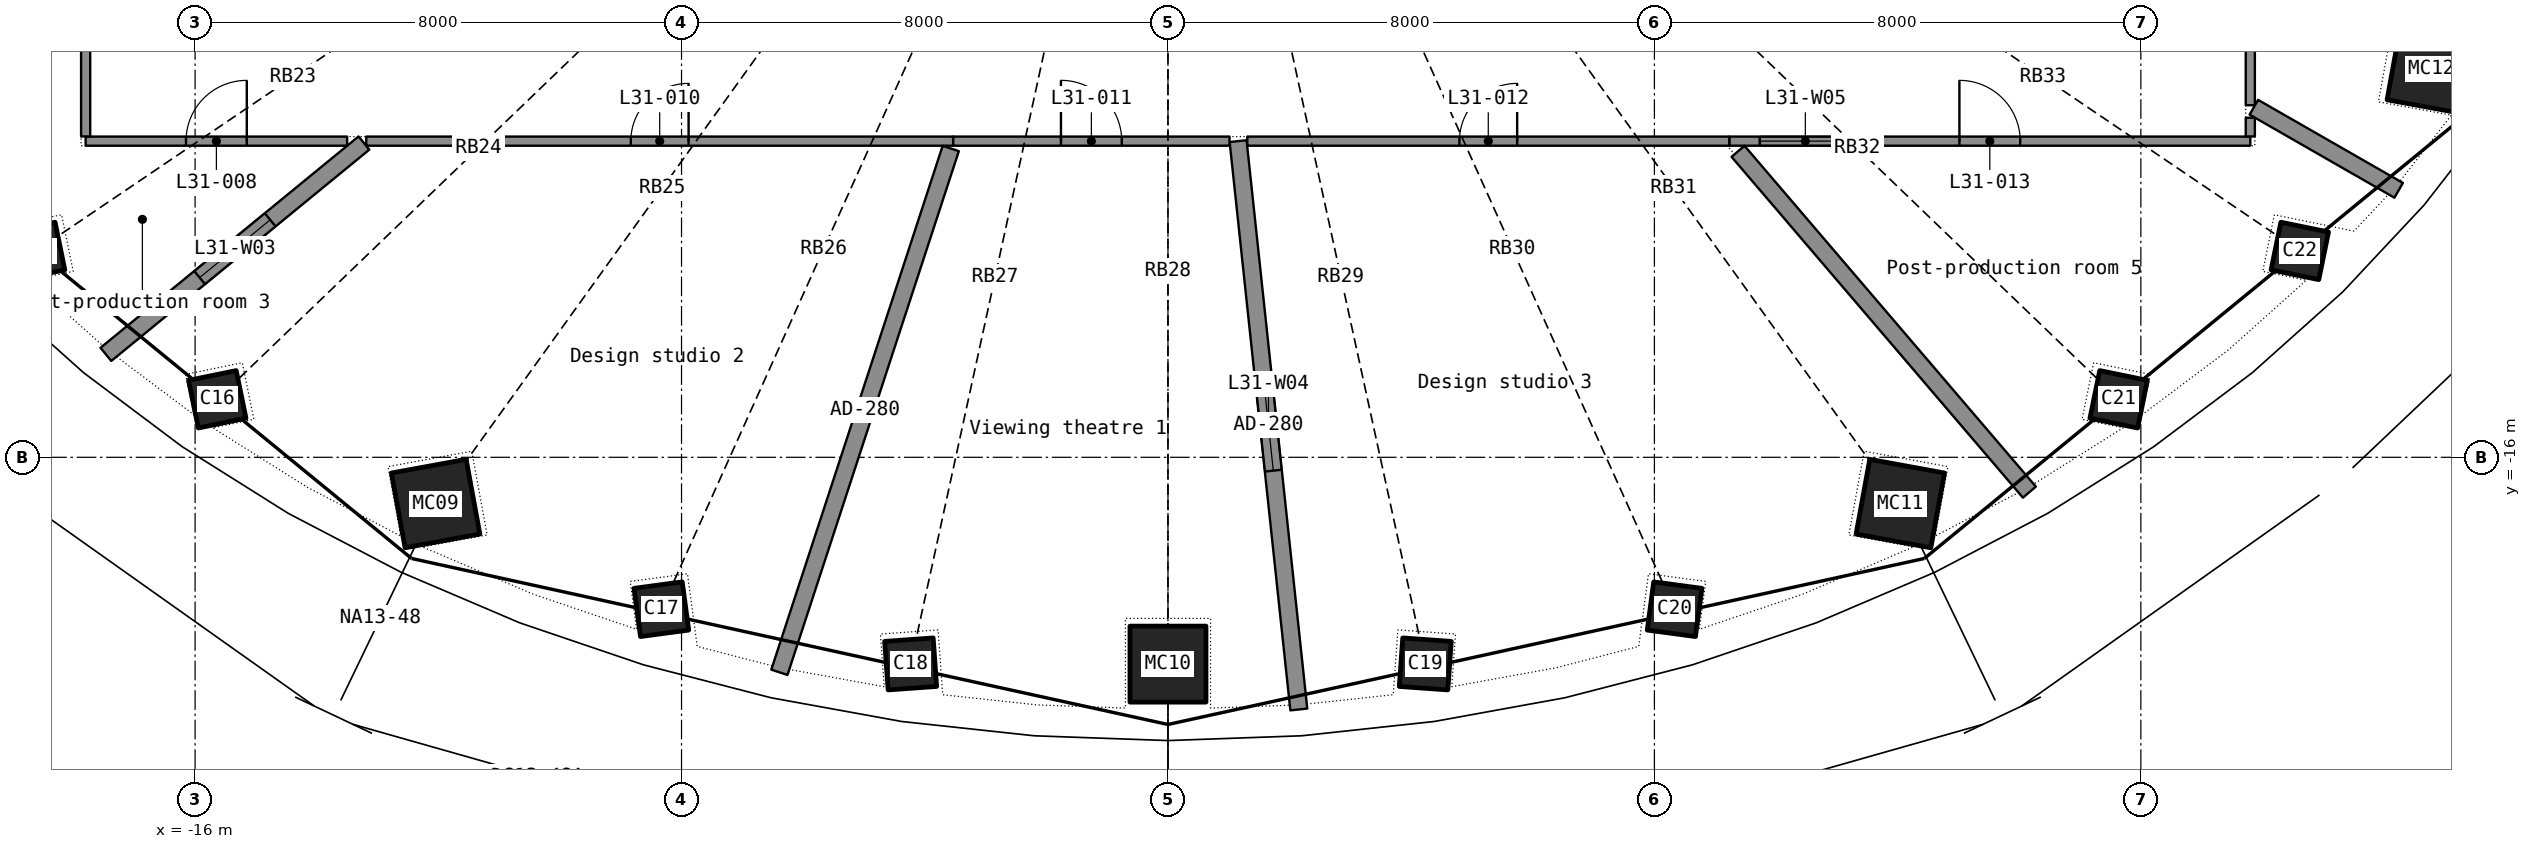
"""IFC4 building model, lengths in metres.
Left out: names, types, materials, properties, quantities, classifications, styles, units other than length and angle.
Written with IfcOpenShell. Run it as: python <this file> out.ifc"""

import sys

from ifc_helpers import new_model, si_unit, direction, frame, frame_2d, origin, origin_2d, place, context, subcontext, project, spatial, rectangle, hollow_rectangle, extrude, element, fill, save


model = new_model("IFC4")
c1 = context("Model", 3, precision=1e-05, world=origin(), true_north=direction((0.0, 1.0)))
c2 = subcontext(c1, "Body", "Model", "MODEL_VIEW")
j1 = project(units=[si_unit("LENGTHUNIT", "METRE"), si_unit("PLANEANGLEUNIT", "RADIAN")], contexts=[c1])
p1 = place(None, origin())
s1 = spatial("IfcSite", under=j1, at=p1, CompositionType="ELEMENT")
p2 = place(p1, origin())
s2 = spatial("IfcBuilding", under=s1, at=p2, CompositionType="ELEMENT")
p3 = place(p2, frame((0.0, 0.0, 130.4)))
s3 = spatial("IfcBuildingStorey", under=s2, at=p3, CompositionType="ELEMENT", Elevation=130.4)
p4 = place(p3, frame((-18.615, -12.606, 0.0), z_axis=(0.026510431, 0.018201192, 0.999482823), x_axis=(-0.719947485, 0.693998498, 0.006457858)))
e1 = element("IfcColumn", 1, at=p4, inside=s3, PredefinedType="COLUMN", context=c2, shape_type="SweptSolid", body=[
    extrude(hollow_rectangle(XDim=0.8, YDim=0.8, WallThickness=0.025, at=origin_2d()), origin(), (0.0, 0.0, 1.0), 3.702),
])
p5 = place(p3, frame((-15.635, -15.046, 0.0), z_axis=(0.02222469, 0.021697101, 0.999517533), x_axis=(-0.828096542, 0.560550728, 0.006244876)))
e2 = element("IfcColumn", 2, at=p5, inside=s3, PredefinedType="COLUMN", context=c2, shape_type="SweptSolid", body=[
    extrude(hollow_rectangle(XDim=0.8, YDim=0.8, WallThickness=0.025, at=origin_2d()), origin(), (0.0, 0.0, 1.0), 3.702),
])
p6 = place(p3, frame((-12.044, -16.76, 0.0), z_axis=(0.017279098, 0.024533681, 0.999549664), x_axis=(-0.907978887, 0.418980963, 0.005412348)))
e3 = element("IfcColumn", 3, at=p6, inside=s3, PredefinedType="COLUMN", context=c2, shape_type="SweptSolid", body=[
    extrude(hollow_rectangle(XDim=1.25, YDim=1.25, WallThickness=0.032, at=origin_2d()), origin(), (0.0, 0.0, 1.0), 3.702),
])
for number, where, z_axis, x_axis in (
    (4, (-8.332, -18.499, 0.0), (0.012, 0.027, 1.0), (-0.96, 0.28, 0.004)),
    (5, (-4.232, -19.398, 0.0), (0.006, 0.028, 1.0), (-0.99, 0.14, 0.002)),
):
    element("IfcColumn", number, at=place(p3, frame(where, z_axis=z_axis, x_axis=x_axis)), inside=s3, PredefinedType="COLUMN", context=c2, shape_type="SweptSolid", body=[
        extrude(hollow_rectangle(XDim=0.8, YDim=0.8, WallThickness=0.025, at=origin_2d()), origin(), (0.0, 0.0, 1.0), 3.702),
    ])
p7 = place(p3, frame((0.0, -19.402, 0.0), z_axis=(0.0, 0.02836019, 0.999597769), x_axis=(-1.0, 0.0, 0.0)))
e6 = element("IfcColumn", 6, at=p7, inside=s3, PredefinedType="COLUMN", context=c2, shape_type="SweptSolid", body=[
    extrude(hollow_rectangle(XDim=1.25, YDim=1.25, WallThickness=0.032, at=origin_2d()), origin(), (0.0, 0.0, 1.0), 3.702),
])
for number, where, z_axis, x_axis in (
    (7, (4.232, -19.398, 0.0), (-0.006, 0.028, 1.0), (-0.99, -0.14, -0.002)),
    (8, (8.332, -18.499, 0.0), (-0.012, 0.027, 1.0), (-0.96, -0.28, -0.004)),
):
    element("IfcColumn", number, at=place(p3, frame(where, z_axis=z_axis, x_axis=x_axis)), inside=s3, PredefinedType="COLUMN", context=c2, shape_type="SweptSolid", body=[
        extrude(hollow_rectangle(XDim=0.8, YDim=0.8, WallThickness=0.025, at=origin_2d()), origin(), (0.0, 0.0, 1.0), 3.702),
    ])
p8 = place(p3, frame((12.044, -16.76, 0.0), z_axis=(-0.017279098, 0.024533681, 0.999549664), x_axis=(-0.907978887, -0.418980963, -0.005412348)))
e9 = element("IfcColumn", 9, at=p8, inside=s3, PredefinedType="COLUMN", context=c2, shape_type="SweptSolid", body=[
    extrude(hollow_rectangle(XDim=1.25, YDim=1.25, WallThickness=0.032, at=origin_2d()), origin(), (0.0, 0.0, 1.0), 3.702),
])
p9 = place(p3, frame((15.635, -15.046, 0.0), z_axis=(-0.02222469, 0.021697101, 0.999517533), x_axis=(-0.828096542, -0.560550728, -0.006244876)))
e10 = element("IfcColumn", 10, at=p9, inside=s3, PredefinedType="COLUMN", context=c2, shape_type="SweptSolid", body=[
    extrude(hollow_rectangle(XDim=0.8, YDim=0.8, WallThickness=0.025, at=origin_2d()), origin(), (0.0, 0.0, 1.0), 3.702),
])
p10 = place(p3, frame((18.615, -12.606, 0.0), z_axis=(-0.026510431, 0.018201192, 0.999482823), x_axis=(-0.719947485, -0.693998498, -0.006457858)))
e11 = element("IfcColumn", 11, at=p10, inside=s3, PredefinedType="COLUMN", context=c2, shape_type="SweptSolid", body=[
    extrude(hollow_rectangle(XDim=0.8, YDim=0.8, WallThickness=0.025, at=origin_2d()), origin(), (0.0, 0.0, 1.0), 3.702),
])
p11 = place(p3, frame((20.777, -9.617, 0.0), z_axis=(-0.029938693, 0.014178016, 0.999451179), x_axis=(-0.583179319, -0.812321691, -0.00594578)))
e12 = element("IfcColumn", 12, at=p11, inside=s3, PredefinedType="COLUMN", context=c2, shape_type="SweptSolid", body=[
    extrude(hollow_rectangle(XDim=1.25, YDim=1.25, WallThickness=0.032, at=origin_2d()), origin(), (0.0, 0.0, 1.0), 3.702),
])
p12 = place(p3, frame((-13.185, -10.8, 0.0), z_axis=(0.0, 0.0, 1.0), x_axis=(1.0, 0.0, 0.0)))
e13 = element("IfcWall", 13, at=p12, inside=s3, PredefinedType="PARTITIONING", context=c2, shape_type="SweptSolid", body=[
    extrude(rectangle(XDim=9.652, YDim=0.15, at=frame_2d((4.826, 0.0))), origin(), (0.0, 0.0, 1.0), 2.4),
])
p13 = place(p12, frame((4.351, 0.0, 0.0)))
e14 = element("IfcOpeningElement", 14, at=p13, cuts=e13, PredefinedType="OPENING", context=c2, shape_type="SweptSolid", body=[
    extrude(rectangle(XDim=0.95, YDim=2.15, at=frame_2d((0.475, 1.075))), frame((0.0, 0.085, 0.0), z_axis=(0.0, -1.0, 0.0), x_axis=(1.0, 0.0, 0.0)), (0.0, 0.0, 1.0), 0.17),
])
p14 = place(p3, frame((2.152, -20.148, 0.0), z_axis=(0.0, 0.0, 1.0), x_axis=(-0.106217678, 0.994342901, 0.0)))
e15 = element("IfcWall", 15, at=p14, inside=s3, PredefinedType="PARTITIONING", context=c2, shape_type="SweptSolid", body=[
    extrude(rectangle(XDim=9.401, YDim=0.28, at=frame_2d((4.7, 0.0))), origin(), (0.0, 0.0, 1.0), 2.4),
])
p15 = place(p14, frame((3.95, 0.0, 1.0)))
e16 = element("IfcOpeningElement", 16, at=p15, cuts=e15, PredefinedType="OPENING", context=c2, shape_type="SweptSolid", body=[
    extrude(rectangle(XDim=1.5, YDim=1.2, at=frame_2d((0.75, 0.6))), frame((0.0, 0.15, 0.0), z_axis=(0.0, -1.0, 0.0), x_axis=(1.0, 0.0, 0.0)), (0.0, 0.0, 1.0), 0.3),
])
p16 = place(p3, frame((-6.391, -19.536, 0.0), z_axis=(0.0, 0.0, 1.0), x_axis=(0.310914325, 0.950437943, 0.0)))
e17 = element("IfcWall", 17, at=p16, inside=s3, PredefinedType="PARTITIONING", context=c2, shape_type="SweptSolid", body=[
    extrude(rectangle(XDim=9.065, YDim=0.28, at=frame_2d((4.532, 0.0))), origin(), (0.0, 0.0, 1.0), 2.4),
])
p17 = place(p3, frame((9.232, -10.8, 0.0), z_axis=(0.0, 0.0, 1.0), x_axis=(1.0, 0.0, 0.0)))
e18 = element("IfcWall", 18, at=p17, inside=s3, PredefinedType="PARTITIONING", context=c2, shape_type="SweptSolid", body=[
    extrude(rectangle(XDim=8.568, YDim=0.15, at=frame_2d((4.284, 0.0))), origin(), (0.0, 0.0, 1.0), 2.4),
])
p18 = place(p17, frame((3.784, 0.0, 0.0)))
e19 = element("IfcOpeningElement", 19, at=p18, cuts=e18, PredefinedType="OPENING", context=c2, shape_type="SweptSolid", body=[
    extrude(rectangle(XDim=1.0, YDim=2.2, at=frame_2d((0.5, 1.1))), frame((0.0, 0.085, 0.0), z_axis=(0.0, -1.0, 0.0), x_axis=(1.0, 0.0, 0.0)), (0.0, 0.0, 1.0), 0.17),
])
p19 = place(p17, frame((0.5, 0.0, 1.0)))
e20 = element("IfcOpeningElement", 20, at=p19, cuts=e18, PredefinedType="OPENING", context=c2, shape_type="SweptSolid", body=[
    extrude(rectangle(XDim=1.5, YDim=1.2, at=frame_2d((0.75, 0.6))), frame((0.0, 0.085, 0.0), z_axis=(0.0, -1.0, 0.0), x_axis=(1.0, 0.0, 0.0)), (0.0, 0.0, 1.0), 0.17),
])
p20 = place(p3, frame((1.304, -10.8, 0.0), z_axis=(0.0, 0.0, 1.0), x_axis=(1.0, 0.0, 0.0)))
e21 = element("IfcWall", 21, at=p20, inside=s3, PredefinedType="PARTITIONING", context=c2, shape_type="SweptSolid", body=[
    extrude(rectangle(XDim=7.927, YDim=0.15, at=frame_2d((3.963, 0.0))), origin(), (0.0, 0.0, 1.0), 2.4),
])
p21 = place(p20, frame((3.488, 0.0, 0.0)))
e22 = element("IfcOpeningElement", 22, at=p21, cuts=e21, PredefinedType="OPENING", context=c2, shape_type="SweptSolid", body=[
    extrude(rectangle(XDim=0.95, YDim=2.15, at=frame_2d((0.475, 1.075))), frame((0.0, 0.085, 0.0), z_axis=(0.0, -1.0, 0.0), x_axis=(1.0, 0.0, 0.0)), (0.0, 0.0, 1.0), 0.17),
])
p22 = place(p3, frame((14.167, -16.573, 0.0), z_axis=(0.0, 0.0, 1.0), x_axis=(-0.649760169, 0.760139279, 0.0)))
e23 = element("IfcWall", 23, at=p22, inside=s3, PredefinedType="PARTITIONING", context=c2, shape_type="SweptSolid", body=[
    extrude(rectangle(XDim=7.374, YDim=0.28, at=frame_2d((3.687, 0.0))), origin(), (0.0, 0.0, 1.0), 2.4),
])
p23 = place(p3, frame((-17.467, -14.307, 0.0), z_axis=(0.0, 0.0, 1.0), x_axis=(0.773600248, 0.633673935, 0.0)))
e24 = element("IfcWall", 24, at=p23, inside=s3, PredefinedType="PARTITIONING", context=c2, shape_type="SweptSolid", body=[
    extrude(rectangle(XDim=5.486, YDim=0.28, at=frame_2d((2.743, 0.0))), origin(), (0.0, 0.0, 1.0), 2.4),
])
p24 = place(p23, frame((1.993, 0.0, 1.0)))
e25 = element("IfcOpeningElement", 25, at=p24, cuts=e24, PredefinedType="OPENING", context=c2, shape_type="SweptSolid", body=[
    extrude(rectangle(XDim=1.5, YDim=1.2, at=frame_2d((0.75, 0.6))), frame((0.0, 0.15, 0.0), z_axis=(0.0, -1.0, 0.0), x_axis=(1.0, 0.0, 0.0)), (0.0, 0.0, 1.0), 0.3),
])
p25 = place(p3, frame((-3.532, -10.8, 0.0), z_axis=(0.0, 0.0, 1.0), x_axis=(1.0, 0.0, 0.0)))
e26 = element("IfcWall", 26, at=p25, inside=s3, PredefinedType="PARTITIONING", context=c2, shape_type="SweptSolid", body=[
    extrude(rectangle(XDim=4.544, YDim=0.15, at=frame_2d((2.272, 0.0))), origin(), (0.0, 0.0, 1.0), 2.4),
])
p26 = place(p25, frame((1.772, 0.0, 0.0)))
e27 = element("IfcOpeningElement", 27, at=p26, cuts=e26, PredefinedType="OPENING", context=c2, shape_type="SweptSolid", body=[
    extrude(rectangle(XDim=1.0, YDim=2.2, at=frame_2d((0.5, 1.1))), frame((0.0, 0.085, 0.0), z_axis=(0.0, -1.0, 0.0), x_axis=(1.0, 0.0, 0.0)), (0.0, 0.0, 1.0), 0.17),
])
p27 = place(p3, frame((-17.8, -10.8, 0.0), z_axis=(0.0, 0.0, 1.0), x_axis=(1.0, 0.0, 0.0)))
e28 = element("IfcWall", 28, at=p27, inside=s3, PredefinedType="PARTITIONING", context=c2, shape_type="SweptSolid", body=[
    extrude(rectangle(XDim=4.301, YDim=0.15, at=frame_2d((2.15, 0.0))), origin(), (0.0, 0.0, 1.0), 2.4),
])
p28 = place(p27, frame((1.65, 0.0, 0.0)))
e29 = element("IfcOpeningElement", 29, at=p28, cuts=e28, PredefinedType="OPENING", context=c2, shape_type="SweptSolid", body=[
    extrude(rectangle(XDim=1.0, YDim=2.2, at=frame_2d((0.5, 1.1))), frame((0.0, 0.085, 0.0), z_axis=(0.0, -1.0, 0.0), x_axis=(1.0, 0.0, 0.0)), (0.0, 0.0, 1.0), 0.17),
])
p29 = place(p3, frame((-17.8, -7.188, 0.0), z_axis=(0.0, 0.0, 1.0), x_axis=(0.0, -1.0, 0.0)))
e30 = element("IfcWall", 30, at=p29, inside=s3, PredefinedType="PARTITIONING", context=c2, shape_type="SweptSolid", body=[
    extrude(rectangle(XDim=3.535, YDim=0.15, at=frame_2d((1.768, 0.0))), origin(), (0.0, 0.0, 1.0), 2.4),
])
p30 = place(p3, frame((17.8, -10.209, 0.0), z_axis=(0.0, 0.0, 1.0), x_axis=(0.0, 1.0, 0.0)))
e31 = element("IfcWall", 31, at=p30, inside=s3, PredefinedType="PARTITIONING", context=c2, shape_type="SweptSolid", body=[
    extrude(rectangle(XDim=2.996, YDim=0.15, at=frame_2d((1.498, 0.0))), origin(), (0.0, 0.0, 1.0), 2.4),
])
p31 = place(p3, frame((20.24, -11.609, 0.0), z_axis=(0.0, 0.0, 1.0), x_axis=(-0.867454205, 0.497517037, 0.0)))
e32 = element("IfcWall", 32, at=p31, inside=s3, PredefinedType="PARTITIONING", context=c2, shape_type="SweptSolid", body=[
    extrude(rectangle(XDim=2.746, YDim=0.28, at=frame_2d((1.373, 0.0))), origin(), (0.0, 0.0, 1.0), 2.4),
])
p32 = place(p3, frame((17.8, -10.723, 0.0), z_axis=(0.0, 0.0, 1.0), x_axis=(0.0, 1.0, 0.0)))
e33 = element("IfcWall", 33, at=p32, inside=s3, PredefinedType="PARTITIONING", context=c2, shape_type="SweptSolid", body=[
    extrude(rectangle(XDim=0.307, YDim=0.15, at=frame_2d((0.154, 0.0))), origin(), (0.0, 0.0, 1.0), 2.4),
])
p33 = place(p28, origin())
e34 = element("IfcDoor", 34, at=p33, inside=s3, OperationType="SINGLE_SWING_RIGHT", PredefinedType="DOOR", context=c2, shape_type="SweptSolid", body=[
    extrude(rectangle(XDim=1.0, YDim=2.2, at=frame_2d((0.5, 1.1))), frame((0.0, 0.025, 0.0), z_axis=(0.0, -1.0, 0.0), x_axis=(1.0, 0.0, 0.0)), (0.0, 0.0, 1.0), 0.05),
])
fill(e29, e34)
p34 = place(p13, origin())
e35 = element("IfcDoor", 35, at=p34, inside=s3, OperationType="SINGLE_SWING_RIGHT", PredefinedType="DOOR", context=c2, shape_type="SweptSolid", body=[
    extrude(rectangle(XDim=0.95, YDim=2.15, at=frame_2d((0.475, 1.075))), frame((0.0, 0.025, 0.0), z_axis=(0.0, -1.0, 0.0), x_axis=(1.0, 0.0, 0.0)), (0.0, 0.0, 1.0), 0.05),
])
fill(e14, e35)
p35 = place(p26, origin())
e36 = element("IfcDoor", 36, at=p35, inside=s3, OperationType="SINGLE_SWING_LEFT", PredefinedType="DOOR", context=c2, shape_type="SweptSolid", body=[
    extrude(rectangle(XDim=1.0, YDim=2.2, at=frame_2d((0.5, 1.1))), frame((0.0, 0.025, 0.0), z_axis=(0.0, -1.0, 0.0), x_axis=(1.0, 0.0, 0.0)), (0.0, 0.0, 1.0), 0.05),
])
fill(e27, e36)
p36 = place(p21, origin())
e37 = element("IfcDoor", 37, at=p36, inside=s3, OperationType="SINGLE_SWING_RIGHT", PredefinedType="DOOR", context=c2, shape_type="SweptSolid", body=[
    extrude(rectangle(XDim=0.95, YDim=2.15, at=frame_2d((0.475, 1.075))), frame((0.0, 0.025, 0.0), z_axis=(0.0, -1.0, 0.0), x_axis=(1.0, 0.0, 0.0)), (0.0, 0.0, 1.0), 0.05),
])
fill(e22, e37)
p37 = place(p18, origin())
e38 = element("IfcDoor", 38, at=p37, inside=s3, OperationType="SINGLE_SWING_LEFT", PredefinedType="DOOR", context=c2, shape_type="SweptSolid", body=[
    extrude(rectangle(XDim=1.0, YDim=2.2, at=frame_2d((0.5, 1.1))), frame((0.0, 0.025, 0.0), z_axis=(0.0, -1.0, 0.0), x_axis=(1.0, 0.0, 0.0)), (0.0, 0.0, 1.0), 0.05),
])
fill(e19, e38)
p38 = place(p24, origin())
e39 = element("IfcWindow", 39, at=p38, inside=s3, PartitioningType="SINGLE_PANEL", PredefinedType="WINDOW", context=c2, shape_type="SweptSolid", body=[
    extrude(rectangle(XDim=1.5, YDim=1.2, at=frame_2d((0.75, 0.6))), frame((0.0, 0.03, 0.0), z_axis=(0.0, -1.0, 0.0), x_axis=(1.0, 0.0, 0.0)), (0.0, 0.0, 1.0), 0.06),
])
fill(e25, e39)
p39 = place(p15, origin())
e40 = element("IfcWindow", 40, at=p39, inside=s3, PartitioningType="SINGLE_PANEL", PredefinedType="WINDOW", context=c2, shape_type="SweptSolid", body=[
    extrude(rectangle(XDim=1.5, YDim=1.2, at=frame_2d((0.75, 0.6))), frame((0.0, 0.03, 0.0), z_axis=(0.0, -1.0, 0.0), x_axis=(1.0, 0.0, 0.0)), (0.0, 0.0, 1.0), 0.06),
])
fill(e16, e40)
p40 = place(p19, origin())
e41 = element("IfcWindow", 41, at=p40, inside=s3, PartitioningType="SINGLE_PANEL", PredefinedType="WINDOW", context=c2, shape_type="SweptSolid", body=[
    extrude(rectangle(XDim=1.5, YDim=1.2, at=frame_2d((0.75, 0.6))), frame((0.0, 0.03, 0.0), z_axis=(0.0, -1.0, 0.0), x_axis=(1.0, 0.0, 0.0)), (0.0, 0.0, 1.0), 0.06),
])
fill(e20, e41)
save(model, sys.argv[1])
